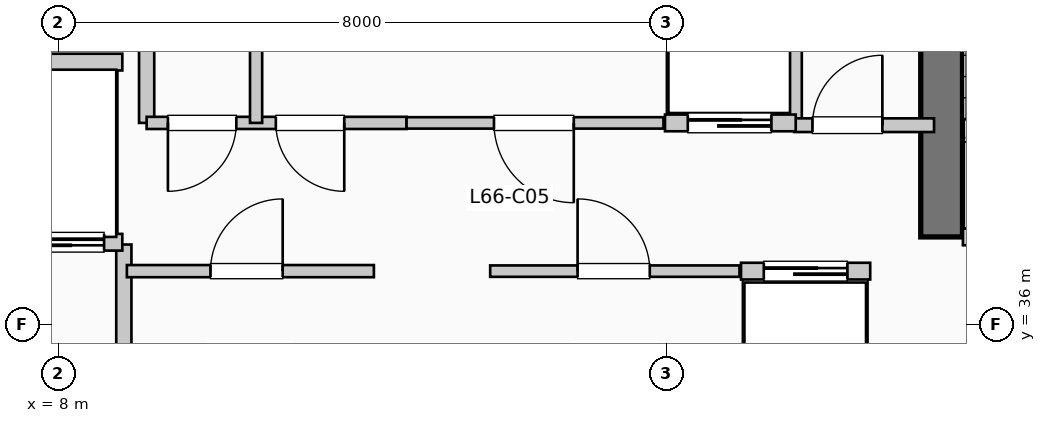
"""IFC4 building model, lengths in metres.
Left out: names, types, materials, properties, quantities, classifications, styles, units other than length and angle.
Written with IfcOpenShell. Run it as: python <this file> out.ifc"""

import sys

from ifc_helpers import new_model, si_unit, direction, frame, frame_2d, origin, place, context, subcontext, project, spatial, rectangle, extrude, element, fill, save


model = new_model("IFC4")
c1 = context("Model", 3, precision=1e-05, world=origin(), true_north=direction((0.0, 1.0)))
c2 = subcontext(c1, "Body", "Model", "MODEL_VIEW")
j1 = project(units=[si_unit("LENGTHUNIT", "METRE"), si_unit("PLANEANGLEUNIT", "RADIAN")], contexts=[c1])
p1 = place(None, origin())
s1 = spatial("IfcSite", under=j1, at=p1, CompositionType="ELEMENT")
p2 = place(p1, origin())
s2 = spatial("IfcBuilding", under=s1, at=p2, CompositionType="ELEMENT")
p3 = place(p2, frame((0.0, 0.0, 272.25)))
s3 = spatial("IfcBuildingStorey", under=s2, at=p3, CompositionType="ELEMENT", Elevation=272.25)
p4 = place(p3, frame((19.62, 37.15, 0.0), z_axis=(0.0, 0.0, 1.0), x_axis=(0.0, 1.0, 0.0)))
e1 = element("IfcWall", 1, at=p4, inside=s3, PredefinedType="SHEAR", context=c2, shape_type="SweptSolid", body=[
    extrude(rectangle(XDim=7.89, YDim=0.55, at=frame_2d((3.945, 0.0))), origin(), (0.0, 0.0, 1.0), 3.96),
])
p5 = place(p3, frame((8.86, 34.55, 0.0), z_axis=(0.0, 0.0, 1.0), x_axis=(0.0, 1.0, 0.0)))
e2 = element("IfcWall", 2, at=p5, inside=s3, PredefinedType="PARTITIONING", context=c2, shape_type="SweptSolid", body=[
    extrude(rectangle(XDim=2.5, YDim=0.2, at=frame_2d((1.25, 0.0))), origin(), (0.0, 0.0, 1.0), 3.74),
])
p6 = place(p3, frame((19.9, 37.15, 0.0), z_axis=(0.0, 0.0, 1.0), x_axis=(1.0, 0.0, 0.0)))
e3 = element("IfcWall", 3, at=p6, inside=s3, PredefinedType="PARTITIONING", context=c2, shape_type="SweptSolid", body=[
    extrude(rectangle(XDim=3.15, YDim=0.22, at=frame_2d((1.575, 0.0))), origin(), (0.0, 0.0, 1.0), 3.74),
])
p7 = place(p6, frame((2.05, 0.0, 0.0), z_axis=(0.0, 0.0, 1.0), x_axis=(-1.0, 0.0, 0.0)))
e4 = element("IfcOpeningElement", 4, at=p7, cuts=e3, PredefinedType="OPENING", context=c2, shape_type="SweptSolid", body=[
    extrude(rectangle(XDim=1.05, YDim=2.15, at=frame_2d((0.525, 1.075))), frame((0.0, 0.12, 0.0), z_axis=(0.0, -1.0, 0.0), x_axis=(1.0, 0.0, 0.0)), (0.0, 0.0, 1.0), 0.24),
])
p8 = place(p3, frame((5.38, 37.08, 0.0), z_axis=(0.0, 0.0, 1.0), x_axis=(1.0, 0.0, 0.0)))
e5 = element("IfcWall", 5, at=p8, inside=s3, PredefinedType="PARTITIONING", context=c2, shape_type="SweptSolid", body=[
    extrude(rectangle(XDim=3.46, YDim=0.22, at=frame_2d((1.73, 0.0))), origin(), (0.0, 0.0, 1.0), 3.74),
])
p9 = place(p8, frame((1.55, 0.0, 0.0), z_axis=(0.0, 0.0, 1.0), x_axis=(-1.0, 0.0, 0.0)))
e6 = element("IfcOpeningElement", 6, at=p9, cuts=e5, PredefinedType="OPENING", context=c2, shape_type="SweptSolid", body=[
    extrude(rectangle(XDim=1.2, YDim=2.2, at=frame_2d((0.6, 1.1))), frame((0.0, 0.12, 0.0), z_axis=(0.0, -1.0, 0.0), x_axis=(1.0, 0.0, 0.0)), (0.0, 0.0, 1.0), 0.24),
])
p10 = place(p8, frame((3.22, 0.0, 0.0), z_axis=(0.0, 0.0, 1.0), x_axis=(-1.0, 0.0, 0.0)))
e7 = element("IfcOpeningElement", 7, at=p10, cuts=e5, PredefinedType="OPENING", context=c2, shape_type="SweptSolid", body=[
    extrude(rectangle(XDim=1.2, YDim=2.2, at=frame_2d((0.6, 1.1))), frame((0.0, 0.12, 0.0), z_axis=(0.0, -1.0, 0.0), x_axis=(1.0, 0.0, 0.0)), (0.0, 0.0, 1.0), 0.24),
])
p11 = place(p3, frame((5.38, 39.45, 0.0), z_axis=(0.0, 0.0, 1.0), x_axis=(1.0, 0.0, 0.0)))
e8 = element("IfcWall", 8, at=p11, inside=s3, PredefinedType="PARTITIONING", context=c2, shape_type="SweptSolid", body=[
    extrude(rectangle(XDim=3.46, YDim=0.22, at=frame_2d((1.73, 0.0))), origin(), (0.0, 0.0, 1.0), 3.74),
])
for number, where, z_axis, x_axis in (
    (9, (9.16, 38.65, 0.0), (0.0, 0.0, 1.0), (0.0, 1.0, 0.0)),
    (10, (17.68, 38.65, 0.0), (0.0, 0.0, 1.0), (0.0, 1.0, 0.0)),
):
    element("IfcWall", number, at=place(p3, frame(where, z_axis=z_axis, x_axis=x_axis)), inside=s3, PredefinedType="PARTITIONING", context=c2, shape_type="SweptSolid", body=[
        extrude(rectangle(XDim=2.35, YDim=0.2, at=frame_2d((1.175, 0.0))), origin(), (0.0, 0.0, 1.0), 3.74),
    ])
p12 = place(p3, frame((17.68, 38.62, 0.0), z_axis=(0.0, 0.0, 1.0), x_axis=(1.0, 0.0, 0.0)))
e11 = element("IfcWall", 11, at=p12, inside=s3, PredefinedType="PARTITIONING", context=c2, shape_type="SweptSolid", body=[
    extrude(rectangle(XDim=1.84, YDim=0.18, at=frame_2d((0.92, 0.0))), origin(), (0.0, 0.0, 1.0), 3.74),
])
p13 = place(p12, frame((0.24, 0.0, 0.0)))
e12 = element("IfcOpeningElement", 12, at=p13, cuts=e11, PredefinedType="OPENING", context=c2, shape_type="SweptSolid", body=[
    extrude(rectangle(XDim=0.92, YDim=2.1, at=frame_2d((0.46, 1.05))), frame((0.0, 0.1, 0.0), z_axis=(0.0, -1.0, 0.0), x_axis=(1.0, 0.0, 0.0)), (0.0, 0.0, 1.0), 0.2),
])
p14 = place(p3, frame((8.9, 36.7, 0.0), z_axis=(0.0, 0.0, 1.0), x_axis=(1.0, 0.0, 0.0)))
e13 = element("IfcWall", 13, at=p14, inside=s3, PredefinedType="PARTITIONING", context=c2, shape_type="SweptSolid", body=[
    extrude(rectangle(XDim=3.25, YDim=0.16, at=frame_2d((1.625, 0.0))), origin(), (0.0, 0.0, 1.0), 3.74),
])
p15 = place(p14, frame((1.1, 0.0, 0.0)))
e14 = element("IfcOpeningElement", 14, at=p15, cuts=e13, PredefinedType="OPENING", context=c2, shape_type="SweptSolid", body=[
    extrude(rectangle(XDim=0.95, YDim=2.15, at=frame_2d((0.475, 1.075))), frame((0.0, 0.09, 0.0), z_axis=(0.0, -1.0, 0.0), x_axis=(1.0, 0.0, 0.0)), (0.0, 0.0, 1.0), 0.18),
])
p16 = place(p3, frame((9.16, 38.65, 0.0), z_axis=(0.0, 0.0, 1.0), x_axis=(1.0, 0.0, 0.0)))
e15 = element("IfcWall", 15, at=p16, inside=s3, PredefinedType="PARTITIONING", context=c2, shape_type="SweptSolid", body=[
    extrude(rectangle(XDim=3.42, YDim=0.16, at=frame_2d((1.71, 0.0))), origin(), (0.0, 0.0, 1.0), 3.74),
])
p17 = place(p16, frame((1.18, 0.0, 0.0), z_axis=(0.0, 0.0, 1.0), x_axis=(-1.0, 0.0, 0.0)))
e16 = element("IfcOpeningElement", 16, at=p17, cuts=e15, PredefinedType="OPENING", context=c2, shape_type="SweptSolid", body=[
    extrude(rectangle(XDim=0.9, YDim=2.15, at=frame_2d((0.45, 1.075))), frame((0.0, 0.09, 0.0), z_axis=(0.0, -1.0, 0.0), x_axis=(1.0, 0.0, 0.0)), (0.0, 0.0, 1.0), 0.18),
])
p18 = place(p16, frame((2.6, 0.0, 0.0), z_axis=(0.0, 0.0, 1.0), x_axis=(-1.0, 0.0, 0.0)))
e17 = element("IfcOpeningElement", 17, at=p18, cuts=e15, PredefinedType="OPENING", context=c2, shape_type="SweptSolid", body=[
    extrude(rectangle(XDim=0.9, YDim=2.15, at=frame_2d((0.45, 1.075))), frame((0.0, 0.09, 0.0), z_axis=(0.0, -1.0, 0.0), x_axis=(1.0, 0.0, 0.0)), (0.0, 0.0, 1.0), 0.18),
])
p19 = place(p3, frame((10.6, 38.65, 0.0), z_axis=(0.0, 0.0, 1.0), x_axis=(0.0, 1.0, 0.0)))
e18 = element("IfcWall", 18, at=p19, inside=s3, PredefinedType="PARTITIONING", context=c2, shape_type="SweptSolid", body=[
    extrude(rectangle(XDim=2.35, YDim=0.16, at=frame_2d((1.175, 0.0))), origin(), (0.0, 0.0, 1.0), 3.74),
])
p20 = place(p3, frame((13.68, 36.7, 0.0), z_axis=(0.0, 0.0, 1.0), x_axis=(1.0, 0.0, 0.0)))
e19 = element("IfcWall", 19, at=p20, inside=s3, PredefinedType="PARTITIONING", context=c2, shape_type="SweptSolid", body=[
    extrude(rectangle(XDim=3.28, YDim=0.15, at=frame_2d((1.64, 0.0))), origin(), (0.0, 0.0, 1.0), 3.74),
])
p21 = place(p20, frame((1.15, 0.0, 0.0)))
e20 = element("IfcOpeningElement", 20, at=p21, cuts=e19, PredefinedType="OPENING", context=c2, shape_type="SweptSolid", body=[
    extrude(rectangle(XDim=0.95, YDim=2.15, at=frame_2d((0.475, 1.075))), frame((0.0, 0.085, 0.0), z_axis=(0.0, -1.0, 0.0), x_axis=(1.0, 0.0, 0.0)), (0.0, 0.0, 1.0), 0.17),
])
p22 = place(p3, frame((12.58, 38.65, 0.0), z_axis=(0.0, 0.0, 1.0), x_axis=(1.0, 0.0, 0.0)))
e21 = element("IfcWall", 21, at=p22, inside=s3, PredefinedType="PARTITIONING", context=c2, shape_type="SweptSolid", body=[
    extrude(rectangle(XDim=3.38, YDim=0.15, at=frame_2d((1.69, 0.0))), origin(), (0.0, 0.0, 1.0), 3.74),
])
p23 = place(p22, frame((2.2, 0.0, 0.0), z_axis=(0.0, 0.0, 1.0), x_axis=(-1.0, 0.0, 0.0)))
e22 = element("IfcOpeningElement", 22, at=p23, cuts=e21, PredefinedType="OPENING", context=c2, shape_type="SweptSolid", body=[
    extrude(rectangle(XDim=1.05, YDim=2.15, at=frame_2d((0.525, 1.075))), frame((0.0, 0.085, 0.0), z_axis=(0.0, -1.0, 0.0), x_axis=(1.0, 0.0, 0.0)), (0.0, 0.0, 1.0), 0.17),
])
p24 = place(p3, frame((16.98, 36.7, 0.0), z_axis=(0.0, 0.0, 1.0), x_axis=(1.0, 0.0, 0.0)))
e23 = element("IfcWall", 23, at=p24, inside=s3, PredefinedType="PARTITIONING", context=c2, shape_type="SweptSolid", body=[
    extrude(rectangle(XDim=1.7, YDim=0.22, at=frame_2d((0.85, 0.0))), origin(), (0.0, 0.0, 1.0), 3.74),
])
p25 = place(p24, frame((0.3, 0.0, 0.0)))
e24 = element("IfcOpeningElement", 24, at=p25, cuts=e23, PredefinedType="OPENING", context=c2, shape_type="SweptSolid", body=[
    extrude(rectangle(XDim=1.1, YDim=2.2, at=frame_2d((0.55, 1.1))), frame((0.0, 0.12, 0.0), z_axis=(0.0, -1.0, 0.0), x_axis=(1.0, 0.0, 0.0)), (0.0, 0.0, 1.0), 0.24),
])
p26 = place(p3, frame((15.98, 38.65, 0.0), z_axis=(0.0, 0.0, 1.0), x_axis=(1.0, 0.0, 0.0)))
e25 = element("IfcWall", 25, at=p26, inside=s3, PredefinedType="PARTITIONING", context=c2, shape_type="SweptSolid", body=[
    extrude(rectangle(XDim=1.72, YDim=0.22, at=frame_2d((0.86, 0.0))), origin(), (0.0, 0.0, 1.0), 3.74),
])
p27 = place(p26, frame((0.3, 0.0, 0.0)))
e26 = element("IfcOpeningElement", 26, at=p27, cuts=e25, PredefinedType="OPENING", context=c2, shape_type="SweptSolid", body=[
    extrude(rectangle(XDim=1.1, YDim=2.2, at=frame_2d((0.55, 1.1))), frame((0.0, 0.12, 0.0), z_axis=(0.0, -1.0, 0.0), x_axis=(1.0, 0.0, 0.0)), (0.0, 0.0, 1.0), 0.24),
])
p28 = place(p10, origin())
e27 = element("IfcDoor", 27, at=p28, inside=s3, OperationType="SLIDING_TO_RIGHT", PredefinedType="DOOR", context=c2, shape_type="SweptSolid", body=[
    extrude(rectangle(XDim=1.2, YDim=2.2, at=frame_2d((0.6, 1.1))), frame((0.0, 0.025, 0.0), z_axis=(0.0, -1.0, 0.0), x_axis=(1.0, 0.0, 0.0)), (0.0, 0.0, 1.0), 0.05),
])
fill(e7, e27)
p29 = place(p13, origin())
e28 = element("IfcDoor", 28, at=p29, inside=s3, OperationType="SINGLE_SWING_RIGHT", PredefinedType="DOOR", context=c2, shape_type="SweptSolid", body=[
    extrude(rectangle(XDim=0.92, YDim=2.1, at=frame_2d((0.46, 1.05))), frame((0.0, 0.025, 0.0), z_axis=(0.0, -1.0, 0.0), x_axis=(1.0, 0.0, 0.0)), (0.0, 0.0, 1.0), 0.05),
])
fill(e12, e28)
p30 = place(p15, origin())
e29 = element("IfcDoor", 29, at=p30, inside=s3, OperationType="SINGLE_SWING_RIGHT", PredefinedType="DOOR", context=c2, shape_type="SweptSolid", body=[
    extrude(rectangle(XDim=0.95, YDim=2.15, at=frame_2d((0.475, 1.075))), frame((0.0, 0.025, 0.0), z_axis=(0.0, -1.0, 0.0), x_axis=(1.0, 0.0, 0.0)), (0.0, 0.0, 1.0), 0.05),
])
fill(e14, e29)
p31 = place(p17, origin())
e30 = element("IfcDoor", 30, at=p31, inside=s3, OperationType="SINGLE_SWING_LEFT", PredefinedType="DOOR", context=c2, shape_type="SweptSolid", body=[
    extrude(rectangle(XDim=0.9, YDim=2.15, at=frame_2d((0.45, 1.075))), frame((0.0, 0.025, 0.0), z_axis=(0.0, -1.0, 0.0), x_axis=(1.0, 0.0, 0.0)), (0.0, 0.0, 1.0), 0.05),
])
fill(e16, e30)
p32 = place(p18, origin())
e31 = element("IfcDoor", 31, at=p32, inside=s3, OperationType="SINGLE_SWING_RIGHT", PredefinedType="DOOR", context=c2, shape_type="SweptSolid", body=[
    extrude(rectangle(XDim=0.9, YDim=2.15, at=frame_2d((0.45, 1.075))), frame((0.0, 0.025, 0.0), z_axis=(0.0, -1.0, 0.0), x_axis=(1.0, 0.0, 0.0)), (0.0, 0.0, 1.0), 0.05),
])
fill(e17, e31)
p33 = place(p21, origin())
e32 = element("IfcDoor", 32, at=p33, inside=s3, OperationType="SINGLE_SWING_LEFT", PredefinedType="DOOR", context=c2, shape_type="SweptSolid", body=[
    extrude(rectangle(XDim=0.95, YDim=2.15, at=frame_2d((0.475, 1.075))), frame((0.0, 0.025, 0.0), z_axis=(0.0, -1.0, 0.0), x_axis=(1.0, 0.0, 0.0)), (0.0, 0.0, 1.0), 0.05),
])
fill(e20, e32)
p34 = place(p23, origin())
e33 = element("IfcDoor", 33, at=p34, inside=s3, OperationType="SINGLE_SWING_RIGHT", PredefinedType="DOOR", context=c2, shape_type="SweptSolid", body=[
    extrude(rectangle(XDim=1.05, YDim=2.15, at=frame_2d((0.525, 1.075))), frame((0.0, 0.025, 0.0), z_axis=(0.0, -1.0, 0.0), x_axis=(1.0, 0.0, 0.0)), (0.0, 0.0, 1.0), 0.05),
])
fill(e22, e33)
p35 = place(p25, origin())
e34 = element("IfcDoor", 34, at=p35, inside=s3, OperationType="SLIDING_TO_LEFT", PredefinedType="DOOR", context=c2, shape_type="SweptSolid", body=[
    extrude(rectangle(XDim=1.1, YDim=2.2, at=frame_2d((0.55, 1.1))), frame((0.0, 0.025, 0.0), z_axis=(0.0, -1.0, 0.0), x_axis=(1.0, 0.0, 0.0)), (0.0, 0.0, 1.0), 0.05),
])
fill(e24, e34)
p36 = place(p27, origin())
e35 = element("IfcDoor", 35, at=p36, inside=s3, OperationType="SLIDING_TO_LEFT", PredefinedType="DOOR", context=c2, shape_type="SweptSolid", body=[
    extrude(rectangle(XDim=1.1, YDim=2.2, at=frame_2d((0.55, 1.1))), frame((0.0, 0.025, 0.0), z_axis=(0.0, -1.0, 0.0), x_axis=(1.0, 0.0, 0.0)), (0.0, 0.0, 1.0), 0.05),
])
fill(e26, e35)
save(model, sys.argv[1])
